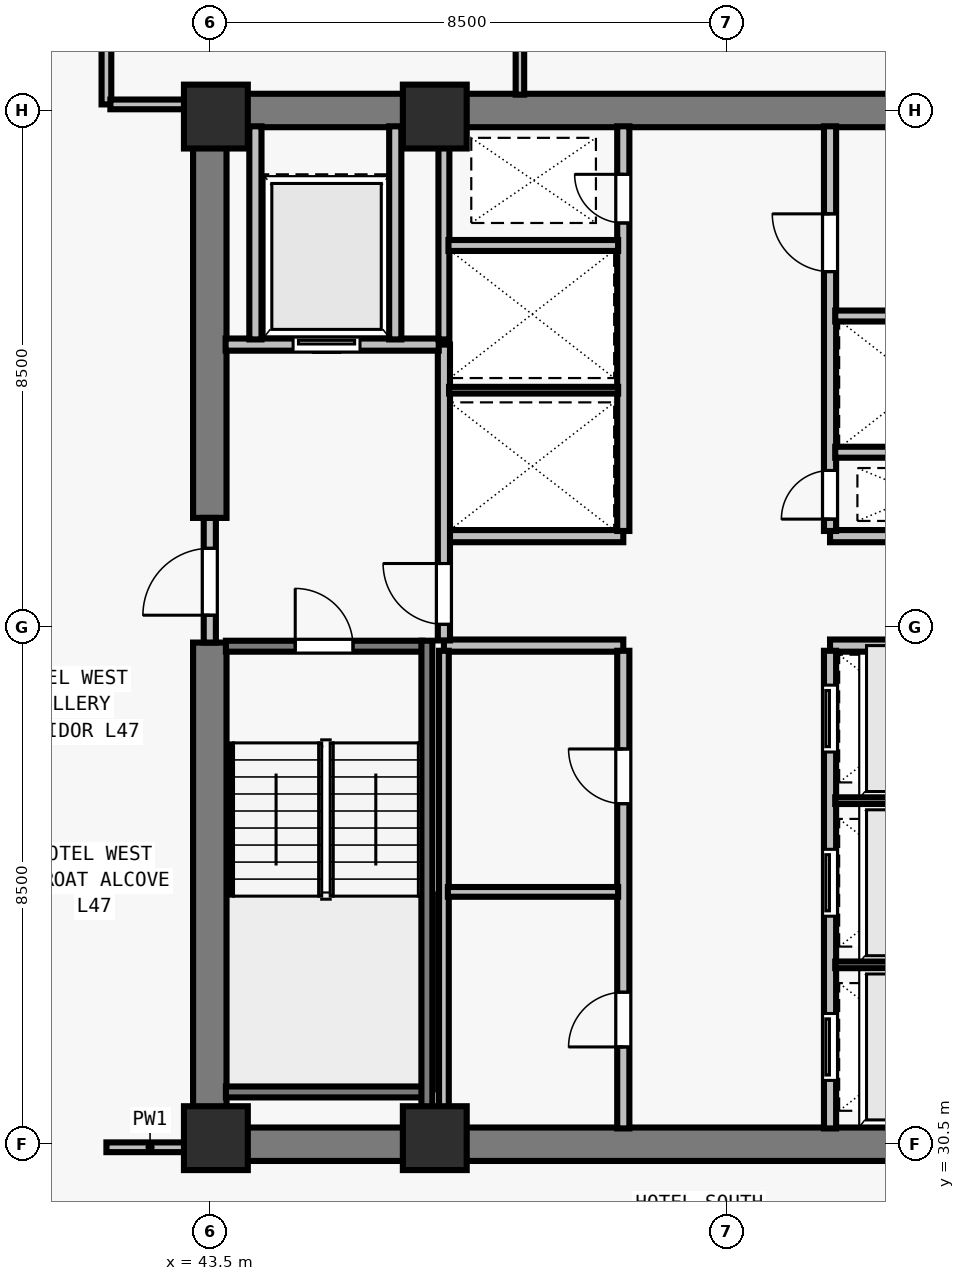
"""IFC4 building model, lengths in metres.
Left out: names, types, materials, properties, quantities, classifications, styles, units other than length and angle.
Written with IfcOpenShell. Run it as: python <this file> out.ifc"""

import sys

from ifc_helpers import new_model, si_unit, direction, frame, frame_2d, origin, origin_2d, place, context, subcontext, project, spatial, rectangle, extrude, element, fill, save


model = new_model("IFC4")
c1 = context("Model", 3, precision=1e-05, world=origin(), true_north=direction((0.0, 1.0)))
c2 = subcontext(c1, "Body", "Model", "MODEL_VIEW")
j1 = project(units=[si_unit("LENGTHUNIT", "METRE"), si_unit("PLANEANGLEUNIT", "RADIAN")], contexts=[c1])
p1 = place(None, origin())
s1 = spatial("IfcSite", under=j1, at=p1, CompositionType="ELEMENT")
p2 = place(p1, origin())
s2 = spatial("IfcBuilding", under=s1, at=p2, CompositionType="ELEMENT")
p3 = place(p2, frame((0.0, 0.0, 172.5)))
s3 = spatial("IfcBuildingStorey", under=s2, at=p3, CompositionType="ELEMENT", Elevation=172.5)
for number, where, z_axis, x_axis in (
    (1, (43.6, 30.6, 0.0), (0.0, 0.0, 1.0), (1.0, 0.0, 0.0)),
    (2, (47.2, 30.6, 0.0), (0.0, 0.0, 1.0), (1.0, 0.0, 0.0)),
    (3, (43.6, 47.4, 0.0), (0.0, 0.0, 1.0), (1.0, 0.0, 0.0)),
    (4, (47.2, 47.4, 0.0), (0.0, 0.0, 1.0), (1.0, 0.0, 0.0)),
):
    element("IfcColumn", number, at=place(p3, frame(where, z_axis=z_axis, x_axis=x_axis)), inside=s3, PredefinedType="COLUMN", context=c2, shape_type="SweptSolid", body=[
        extrude(rectangle(XDim=1.05, YDim=1.05, at=origin_2d()), origin(), (0.0, 0.0, 1.0), 3.5),
    ])
for number, where, z_axis, x_axis in (
    (5, (43.225, 30.5, 0.0), (0.0, 0.0, 1.0), (1.0, 0.0, 0.0)),
    (6, (43.225, 47.5, 0.0), (0.0, 0.0, 1.0), (1.0, 0.0, 0.0)),
):
    element("IfcWall", number, at=place(p3, frame(where, z_axis=z_axis, x_axis=x_axis)), inside=s3, PredefinedType="SHEAR", context=c2, shape_type="SweptSolid", body=[
        extrude(rectangle(XDim=17.55, YDim=0.55, at=frame_2d((8.775, 0.0))), origin(), (0.0, 0.0, 1.0), 3.28),
    ])
p4 = place(p3, frame((43.5, 30.765, 0.0), z_axis=(0.0, 0.0, 1.0), x_axis=(0.0, 1.0, 0.0)))
e7 = element("IfcWall", 7, at=p4, inside=s3, PredefinedType="SHEAR", context=c2, shape_type="SweptSolid", body=[
    extrude(rectangle(XDim=7.985, YDim=0.55, at=frame_2d((3.993, 0.0))), origin(), (0.0, 0.0, 1.0), 3.28),
])
p5 = place(p3, frame((43.5, 40.8, 0.0), z_axis=(0.0, 0.0, 1.0), x_axis=(0.0, 1.0, 0.0)))
e8 = element("IfcWall", 8, at=p5, inside=s3, PredefinedType="SHEAR", context=c2, shape_type="SweptSolid", body=[
    extrude(rectangle(XDim=6.435, YDim=0.55, at=frame_2d((3.218, 0.0))), origin(), (0.0, 0.0, 1.0), 3.28),
])
for number, where, z_axis, x_axis in (
    (9, (47.35, 38.7, 0.0), (0.0, 0.0, 1.0), (1.0, 0.0, 0.0)),
    (10, (47.35, 40.5, 0.0), (0.0, 0.0, 1.0), (1.0, 0.0, 0.0)),
    (11, (53.7, 38.7, 0.0), (0.0, 0.0, 1.0), (1.0, 0.0, 0.0)),
    (12, (53.7, 40.5, 0.0), (0.0, 0.0, 1.0), (1.0, 0.0, 0.0)),
):
    element("IfcWall", number, at=place(p3, frame(where, z_axis=z_axis, x_axis=x_axis)), inside=s3, PredefinedType="SOLIDWALL", context=c2, shape_type="SweptSolid", body=[
        extrude(rectangle(XDim=2.95, YDim=0.2, at=frame_2d((1.475, 0.0))), origin(), (0.0, 0.0, 1.0), 3.28),
    ])
p6 = place(p3, frame((50.3, 30.76, 0.0), z_axis=(0.0, 0.0, 1.0), x_axis=(0.0, 1.0, 0.0)))
e13 = element("IfcWall", 13, at=p6, inside=s3, PredefinedType="SOLIDWALL", context=c2, shape_type="SweptSolid", body=[
    extrude(rectangle(XDim=7.855, YDim=0.2, at=frame_2d((3.927, 0.0))), origin(), (0.0, 0.0, 1.0), 3.28),
])
p7 = place(p6, frame((1.34, 0.0, 0.0)))
e14 = element("IfcOpeningElement", 14, at=p7, cuts=e13, PredefinedType="OPENING", context=c2, shape_type="SweptSolid", body=[
    extrude(rectangle(XDim=0.9, YDim=2.12, at=frame_2d((0.45, 1.06))), frame((0.0, 0.11, 0.0), z_axis=(0.0, -1.0, 0.0), x_axis=(1.0, 0.0, 0.0)), (0.0, 0.0, 1.0), 0.22),
])
p8 = place(p6, frame((5.34, 0.0, 0.0)))
e15 = element("IfcOpeningElement", 15, at=p8, cuts=e13, PredefinedType="OPENING", context=c2, shape_type="SweptSolid", body=[
    extrude(rectangle(XDim=0.9, YDim=2.12, at=frame_2d((0.45, 1.06))), frame((0.0, 0.11, 0.0), z_axis=(0.0, -1.0, 0.0), x_axis=(1.0, 0.0, 0.0)), (0.0, 0.0, 1.0), 0.22),
])
p9 = place(p3, frame((53.7, 30.76, 0.0), z_axis=(0.0, 0.0, 1.0), x_axis=(0.0, 1.0, 0.0)))
e16 = element("IfcWall", 16, at=p9, inside=s3, PredefinedType="SOLIDWALL", context=c2, shape_type="SweptSolid", body=[
    extrude(rectangle(XDim=7.855, YDim=0.2, at=frame_2d((3.927, 0.0))), origin(), (0.0, 0.0, 1.0), 3.28),
])
p10 = place(p9, frame((0.79, 0.0, 0.0)))
e17 = element("IfcOpeningElement", 17, at=p10, cuts=e16, PredefinedType="OPENING", context=c2, shape_type="SweptSolid", body=[
    extrude(rectangle(XDim=1.1, YDim=2.2, at=frame_2d((0.55, 1.1))), frame((0.0, 0.11, 0.0), z_axis=(0.0, -1.0, 0.0), x_axis=(1.0, 0.0, 0.0)), (0.0, 0.0, 1.0), 0.22),
])
p11 = place(p9, frame((3.49, 0.0, 0.0)))
e18 = element("IfcOpeningElement", 18, at=p11, cuts=e16, PredefinedType="OPENING", context=c2, shape_type="SweptSolid", body=[
    extrude(rectangle(XDim=1.1, YDim=2.2, at=frame_2d((0.55, 1.1))), frame((0.0, 0.11, 0.0), z_axis=(0.0, -1.0, 0.0), x_axis=(1.0, 0.0, 0.0)), (0.0, 0.0, 1.0), 0.22),
])
p12 = place(p9, frame((6.19, 0.0, 0.0)))
e19 = element("IfcOpeningElement", 19, at=p12, cuts=e16, PredefinedType="OPENING", context=c2, shape_type="SweptSolid", body=[
    extrude(rectangle(XDim=1.1, YDim=2.2, at=frame_2d((0.55, 1.1))), frame((0.0, 0.11, 0.0), z_axis=(0.0, -1.0, 0.0), x_axis=(1.0, 0.0, 0.0)), (0.0, 0.0, 1.0), 0.22),
])
p13 = place(p3, frame((50.3, 40.585, 0.0), z_axis=(0.0, 0.0, 1.0), x_axis=(0.0, 1.0, 0.0)))
e20 = element("IfcWall", 20, at=p13, inside=s3, PredefinedType="SOLIDWALL", context=c2, shape_type="SweptSolid", body=[
    extrude(rectangle(XDim=6.655, YDim=0.2, at=frame_2d((3.328, 0.0))), origin(), (0.0, 0.0, 1.0), 3.28),
])
p14 = place(p13, frame((5.065, 0.0, 0.0)))
e21 = element("IfcOpeningElement", 21, at=p14, cuts=e20, PredefinedType="OPENING", context=c2, shape_type="SweptSolid", body=[
    extrude(rectangle(XDim=0.8, YDim=2.08, at=frame_2d((0.4, 1.04))), frame((0.0, 0.11, 0.0), z_axis=(0.0, -1.0, 0.0), x_axis=(1.0, 0.0, 0.0)), (0.0, 0.0, 1.0), 0.22),
])
p15 = place(p3, frame((53.7, 40.585, 0.0), z_axis=(0.0, 0.0, 1.0), x_axis=(0.0, 1.0, 0.0)))
e22 = element("IfcWall", 22, at=p15, inside=s3, PredefinedType="SOLIDWALL", context=c2, shape_type="SweptSolid", body=[
    extrude(rectangle(XDim=6.655, YDim=0.2, at=frame_2d((3.328, 0.0))), origin(), (0.0, 0.0, 1.0), 3.28),
])
p16 = place(p15, frame((0.195, 0.0, 0.0)))
e23 = element("IfcOpeningElement", 23, at=p16, cuts=e22, PredefinedType="OPENING", context=c2, shape_type="SweptSolid", body=[
    extrude(rectangle(XDim=0.8, YDim=2.08, at=frame_2d((0.4, 1.04))), frame((0.0, 0.11, 0.0), z_axis=(0.0, -1.0, 0.0), x_axis=(1.0, 0.0, 0.0)), (0.0, 0.0, 1.0), 0.22),
])
p17 = place(p15, frame((4.265, 0.0, 0.0)))
e24 = element("IfcOpeningElement", 24, at=p17, cuts=e22, PredefinedType="OPENING", context=c2, shape_type="SweptSolid", body=[
    extrude(rectangle(XDim=0.95, YDim=2.12, at=frame_2d((0.475, 1.06))), frame((0.0, 0.11, 0.0), z_axis=(0.0, -1.0, 0.0), x_axis=(1.0, 0.0, 0.0)), (0.0, 0.0, 1.0), 0.22),
])
p18 = place(p3, frame((43.5, 38.75, 0.0), z_axis=(0.0, 0.0, 1.0), x_axis=(0.0, 1.0, 0.0)))
e25 = element("IfcWall", 25, at=p18, inside=s3, PredefinedType="SOLIDWALL", context=c2, shape_type="SweptSolid", body=[
    extrude(rectangle(XDim=2.05, YDim=0.2, at=frame_2d((1.025, 0.0))), origin(), (0.0, 0.0, 1.0), 3.28),
])
p19 = place(p18, frame((0.45, 0.0, 0.0)))
e26 = element("IfcOpeningElement", 26, at=p19, cuts=e25, PredefinedType="OPENING", context=c2, shape_type="SweptSolid", body=[
    extrude(rectangle(XDim=1.1, YDim=2.15, at=frame_2d((0.55, 1.075))), frame((0.0, 0.11, 0.0), z_axis=(0.0, -1.0, 0.0), x_axis=(1.0, 0.0, 0.0)), (0.0, 0.0, 1.0), 0.22),
])
p20 = place(p3, frame((47.35, 38.785, 0.0), z_axis=(0.0, 0.0, 1.0), x_axis=(0.0, 1.0, 0.0)))
e27 = element("IfcWall", 27, at=p20, inside=s3, PredefinedType="SOLIDWALL", context=c2, shape_type="SweptSolid", body=[
    extrude(rectangle(XDim=4.865, YDim=0.2, at=frame_2d((2.433, 0.0))), origin(), (0.0, 0.0, 1.0), 3.28),
])
p21 = place(p20, frame((0.265, 0.0, 0.0)))
e28 = element("IfcOpeningElement", 28, at=p21, cuts=e27, PredefinedType="OPENING", context=c2, shape_type="SweptSolid", body=[
    extrude(rectangle(XDim=1.0, YDim=2.15, at=frame_2d((0.5, 1.075))), frame((0.0, 0.11, 0.0), z_axis=(0.0, -1.0, 0.0), x_axis=(1.0, 0.0, 0.0)), (0.0, 0.0, 1.0), 0.22),
])
p22 = place(p3, frame((43.76, 43.65, 0.0), z_axis=(0.0, 0.0, 1.0), x_axis=(1.0, 0.0, 0.0)))
e29 = element("IfcWall", 29, at=p22, inside=s3, PredefinedType="SOLIDWALL", context=c2, shape_type="SweptSolid", body=[
    extrude(rectangle(XDim=3.505, YDim=0.2, at=frame_2d((1.752, 0.0))), origin(), (0.0, 0.0, 1.0), 3.28),
])
p23 = place(p22, frame((1.11, 0.0, 0.0)))
e30 = element("IfcOpeningElement", 30, at=p23, cuts=e29, PredefinedType="OPENING", context=c2, shape_type="SweptSolid", body=[
    extrude(rectangle(XDim=1.1, YDim=2.2, at=frame_2d((0.55, 1.1))), frame((0.0, 0.11, 0.0), z_axis=(0.0, -1.0, 0.0), x_axis=(1.0, 0.0, 0.0)), (0.0, 0.0, 1.0), 0.22),
])
for number, where, z_axis, x_axis in (
    (31, (46.55, 43.735, 0.0), (0.0, 0.0, 1.0), (0.0, 1.0, 0.0)),
    (32, (44.25, 43.735, 0.0), (0.0, 0.0, 1.0), (0.0, 1.0, 0.0)),
):
    element("IfcWall", number, at=place(p3, frame(where, z_axis=z_axis, x_axis=x_axis)), inside=s3, PredefinedType="SOLIDWALL", context=c2, shape_type="SweptSolid", body=[
        extrude(rectangle(XDim=3.505, YDim=0.2, at=frame_2d((1.752, 0.0))), origin(), (0.0, 0.0, 1.0), 3.28),
    ])
p24 = place(p3, frame((47.35, 30.76, 0.0), z_axis=(0.0, 0.0, 1.0), x_axis=(0.0, 1.0, 0.0)))
e33 = element("IfcWall", 33, at=p24, inside=s3, PredefinedType="PARTITIONING", context=c2, shape_type="SweptSolid", body=[
    extrude(rectangle(XDim=7.855, YDim=0.16, at=frame_2d((3.927, 0.0))), origin(), (0.0, 0.0, 1.0), 3.28),
])
p25 = place(p3, frame((47.415, 34.65, 0.0), z_axis=(0.0, 0.0, 1.0), x_axis=(1.0, 0.0, 0.0)))
e34 = element("IfcWall", 34, at=p25, inside=s3, PredefinedType="PARTITIONING", context=c2, shape_type="SweptSolid", body=[
    extrude(rectangle(XDim=2.8, YDim=0.16, at=frame_2d((1.4, 0.0))), origin(), (0.0, 0.0, 1.0), 3.28),
])
for number, where, z_axis, x_axis in (
    (35, (53.785, 33.45, 0.0), (0.0, 0.0, 1.0), (1.0, 0.0, 0.0)),
    (36, (53.785, 36.15, 0.0), (0.0, 0.0, 1.0), (1.0, 0.0, 0.0)),
):
    element("IfcWall", number, at=place(p3, frame(where, z_axis=z_axis, x_axis=x_axis)), inside=s3, PredefinedType="PARTITIONING", context=c2, shape_type="SweptSolid", body=[
        extrude(rectangle(XDim=2.79, YDim=0.11, at=frame_2d((1.395, 0.0))), origin(), (0.0, 0.0, 1.0), 3.28),
    ])
p26 = place(p3, frame((47.35, 43.735, 0.0), z_axis=(0.0, 0.0, 1.0), x_axis=(0.0, 1.0, 0.0)))
e37 = element("IfcWall", 37, at=p26, inside=s3, PredefinedType="SOLIDWALL", context=c2, shape_type="SweptSolid", body=[
    extrude(rectangle(XDim=3.505, YDim=0.18, at=frame_2d((1.752, 0.0))), origin(), (0.0, 0.0, 1.0), 3.28),
])
p27 = place(p3, frame((47.435, 42.9, 0.0), z_axis=(0.0, 0.0, 1.0), x_axis=(1.0, 0.0, 0.0)))
e38 = element("IfcWall", 38, at=p27, inside=s3, PredefinedType="PARTITIONING", context=c2, shape_type="SweptSolid", body=[
    extrude(rectangle(XDim=2.78, YDim=0.11, at=frame_2d((1.39, 0.0))), origin(), (0.0, 0.0, 1.0), 3.28),
])
p28 = place(p3, frame((47.425, 45.28, 0.0), z_axis=(0.0, 0.0, 1.0), x_axis=(1.0, 0.0, 0.0)))
e39 = element("IfcWall", 39, at=p28, inside=s3, PredefinedType="SOLIDWALL", context=c2, shape_type="SweptSolid", body=[
    extrude(rectangle(XDim=2.79, YDim=0.18, at=frame_2d((1.395, 0.0))), origin(), (0.0, 0.0, 1.0), 3.28),
])
p29 = place(p3, frame((53.785, 41.88, 0.0), z_axis=(0.0, 0.0, 1.0), x_axis=(1.0, 0.0, 0.0)))
e40 = element("IfcWall", 40, at=p29, inside=s3, PredefinedType="SOLIDWALL", context=c2, shape_type="SweptSolid", body=[
    extrude(rectangle(XDim=2.78, YDim=0.18, at=frame_2d((1.39, 0.0))), origin(), (0.0, 0.0, 1.0), 3.28),
])
p30 = place(p3, frame((53.785, 44.12, 0.0), z_axis=(0.0, 0.0, 1.0), x_axis=(1.0, 0.0, 0.0)))
e41 = element("IfcWall", 41, at=p30, inside=s3, PredefinedType="SOLIDWALL", context=c2, shape_type="SweptSolid", body=[
    extrude(rectangle(XDim=2.79, YDim=0.18, at=frame_2d((1.395, 0.0))), origin(), (0.0, 0.0, 1.0), 3.28),
])
p31 = place(p3, frame((41.8, 47.6, 0.0), z_axis=(0.0, 0.0, 1.0), x_axis=(0.0, 1.0, 0.0)))
e42 = element("IfcWall", 42, at=p31, inside=s3, PredefinedType="PARTITIONING", context=c2, shape_type="SweptSolid", body=[
    extrude(rectangle(XDim=15.075, YDim=0.16, at=frame_2d((7.538, 0.0))), origin(), (0.0, 0.0, 1.0), 2.555),
])
p32 = place(p31, frame((3.5, 0.0, 0.0)))
e43 = element("IfcOpeningElement", 43, at=p32, cuts=e42, PredefinedType="OPENING", context=c2, shape_type="SweptSolid", body=[
    extrude(rectangle(XDim=0.96, YDim=2.12, at=frame_2d((0.48, 1.06))), frame((0.0, 0.09, 0.0), z_axis=(0.0, -1.0, 0.0), x_axis=(1.0, 0.0, 0.0)), (0.0, 0.0, 1.0), 0.18),
])
p33 = place(p3, frame((41.8, 30.45, 0.0), z_axis=(0.0, 0.0, 1.0), x_axis=(1.0, 0.0, 0.0)))
e44 = element("IfcWall", 44, at=p33, inside=s3, PredefinedType="PARTITIONING", context=c2, shape_type="SweptSolid", body=[
    extrude(rectangle(XDim=1.435, YDim=0.16, at=frame_2d((0.718, 0.0))), origin(), (0.0, 0.0, 1.0), 3.28),
])
p34 = place(p3, frame((41.865, 47.6, 0.0), z_axis=(0.0, 0.0, 1.0), x_axis=(1.0, 0.0, 0.0)))
e45 = element("IfcWall", 45, at=p34, inside=s3, PredefinedType="PARTITIONING", context=c2, shape_type="SweptSolid", body=[
    extrude(rectangle(XDim=1.37, YDim=0.16, at=frame_2d((0.685, 0.0))), origin(), (0.0, 0.0, 1.0), 3.28),
])
p35 = place(p3, frame((48.6, 47.76, 0.0), z_axis=(0.0, 0.0, 1.0), x_axis=(0.0, 1.0, 0.0)))
e46 = element("IfcWall", 46, at=p35, inside=s3, PredefinedType="PARTITIONING", context=c2, shape_type="SweptSolid", body=[
    extrude(rectangle(XDim=14.915, YDim=0.14, at=frame_2d((7.458, 0.0))), origin(), (0.0, 0.0, 1.0), 2.896),
])
p36 = place(p35, frame((2.34, 0.0, 0.0)))
e47 = element("IfcOpeningElement", 47, at=p36, cuts=e46, PredefinedType="OPENING", context=c2, shape_type="SweptSolid", body=[
    extrude(rectangle(XDim=0.96, YDim=2.12, at=frame_2d((0.48, 1.06))), frame((0.0, 0.08, 0.0), z_axis=(0.0, -1.0, 0.0), x_axis=(1.0, 0.0, 0.0)), (0.0, 0.0, 1.0), 0.16),
])
p37 = place(p3, frame((43.765, 38.69, 0.0), z_axis=(0.0, 0.0, 1.0), x_axis=(1.0, 0.0, 0.0)))
e48 = element("IfcWall", 48, at=p37, inside=s3, PredefinedType="SOLIDWALL", context=c2, shape_type="SweptSolid", body=[
    extrude(rectangle(XDim=3.23, YDim=0.18, at=frame_2d((1.615, 0.0))), origin(), (0.0, 0.0, 1.0), 3.28),
])
p38 = place(p37, frame((1.14, 0.0, 0.0)))
e49 = element("IfcOpeningElement", 49, at=p38, cuts=e48, PredefinedType="OPENING", context=c2, shape_type="SweptSolid", body=[
    extrude(rectangle(XDim=0.95, YDim=2.15, at=frame_2d((0.475, 1.075))), frame((0.0, 0.1, 0.0), z_axis=(0.0, -1.0, 0.0), x_axis=(1.0, 0.0, 0.0)), (0.0, 0.0, 1.0), 0.2),
])
p39 = place(p3, frame((43.765, 31.36, 0.0), z_axis=(0.0, 0.0, 1.0), x_axis=(1.0, 0.0, 0.0)))
e50 = element("IfcWall", 50, at=p39, inside=s3, PredefinedType="SOLIDWALL", context=c2, shape_type="SweptSolid", body=[
    extrude(rectangle(XDim=3.23, YDim=0.18, at=frame_2d((1.615, 0.0))), origin(), (0.0, 0.0, 1.0), 3.28),
])
p40 = place(p3, frame((47.07, 38.78, 0.0), z_axis=(0.0, 0.0, 1.0), x_axis=(0.0, -1.0, 0.0)))
e51 = element("IfcWall", 51, at=p40, inside=s3, PredefinedType="SOLIDWALL", context=c2, shape_type="SweptSolid", body=[
    extrude(rectangle(XDim=8.017, YDim=0.18, at=frame_2d((4.009, 0.0))), origin(), (0.0, 0.0, 1.0), 3.28),
])
p41 = place(p19, origin())
e52 = element("IfcDoor", 52, at=p41, inside=s3, OperationType="SINGLE_SWING_LEFT", PredefinedType="DOOR", context=c2, shape_type="SweptSolid", body=[
    extrude(rectangle(XDim=1.1, YDim=2.15, at=frame_2d((0.55, 1.075))), frame((0.0, 0.025, 0.0), z_axis=(0.0, -1.0, 0.0), x_axis=(1.0, 0.0, 0.0)), (0.0, 0.0, 1.0), 0.05),
])
fill(e26, e52)
p42 = place(p21, origin())
e53 = element("IfcDoor", 53, at=p42, inside=s3, OperationType="SINGLE_SWING_RIGHT", PredefinedType="DOOR", context=c2, shape_type="SweptSolid", body=[
    extrude(rectangle(XDim=1.0, YDim=2.15, at=frame_2d((0.5, 1.075))), frame((0.0, 0.025, 0.0), z_axis=(0.0, -1.0, 0.0), x_axis=(1.0, 0.0, 0.0)), (0.0, 0.0, 1.0), 0.05),
])
fill(e28, e53)
p43 = place(p23, origin())
e54 = element("IfcDoor", 54, at=p43, inside=s3, OperationType="SLIDING_TO_LEFT", PredefinedType="DOOR", context=c2, shape_type="SweptSolid", body=[
    extrude(rectangle(XDim=1.1, YDim=2.2, at=frame_2d((0.55, 1.1))), frame((0.0, 0.025, 0.0), z_axis=(0.0, -1.0, 0.0), x_axis=(1.0, 0.0, 0.0)), (0.0, 0.0, 1.0), 0.05),
])
fill(e30, e54)
p44 = place(p7, origin())
e55 = element("IfcDoor", 55, at=p44, inside=s3, OperationType="SINGLE_SWING_LEFT", PredefinedType="DOOR", context=c2, shape_type="SweptSolid", body=[
    extrude(rectangle(XDim=0.9, YDim=2.12, at=frame_2d((0.45, 1.06))), frame((0.0, 0.025, 0.0), z_axis=(0.0, -1.0, 0.0), x_axis=(1.0, 0.0, 0.0)), (0.0, 0.0, 1.0), 0.05),
])
fill(e14, e55)
p45 = place(p8, origin())
e56 = element("IfcDoor", 56, at=p45, inside=s3, OperationType="SINGLE_SWING_RIGHT", PredefinedType="DOOR", context=c2, shape_type="SweptSolid", body=[
    extrude(rectangle(XDim=0.9, YDim=2.12, at=frame_2d((0.45, 1.06))), frame((0.0, 0.025, 0.0), z_axis=(0.0, -1.0, 0.0), x_axis=(1.0, 0.0, 0.0)), (0.0, 0.0, 1.0), 0.05),
])
fill(e15, e56)
p46 = place(p10, origin())
e57 = element("IfcDoor", 57, at=p46, inside=s3, OperationType="SLIDING_TO_LEFT", PredefinedType="DOOR", context=c2, shape_type="SweptSolid", body=[
    extrude(rectangle(XDim=1.1, YDim=2.2, at=frame_2d((0.55, 1.1))), frame((0.0, 0.025, 0.0), z_axis=(0.0, -1.0, 0.0), x_axis=(1.0, 0.0, 0.0)), (0.0, 0.0, 1.0), 0.05),
])
fill(e17, e57)
p47 = place(p11, origin())
e58 = element("IfcDoor", 58, at=p47, inside=s3, OperationType="SLIDING_TO_LEFT", PredefinedType="DOOR", context=c2, shape_type="SweptSolid", body=[
    extrude(rectangle(XDim=1.1, YDim=2.2, at=frame_2d((0.55, 1.1))), frame((0.0, 0.025, 0.0), z_axis=(0.0, -1.0, 0.0), x_axis=(1.0, 0.0, 0.0)), (0.0, 0.0, 1.0), 0.05),
])
fill(e18, e58)
p48 = place(p12, origin())
e59 = element("IfcDoor", 59, at=p48, inside=s3, OperationType="SLIDING_TO_LEFT", PredefinedType="DOOR", context=c2, shape_type="SweptSolid", body=[
    extrude(rectangle(XDim=1.1, YDim=2.2, at=frame_2d((0.55, 1.1))), frame((0.0, 0.025, 0.0), z_axis=(0.0, -1.0, 0.0), x_axis=(1.0, 0.0, 0.0)), (0.0, 0.0, 1.0), 0.05),
])
fill(e19, e59)
p49 = place(p14, origin())
e60 = element("IfcDoor", 60, at=p49, inside=s3, OperationType="SINGLE_SWING_RIGHT", PredefinedType="DOOR", context=c2, shape_type="SweptSolid", body=[
    extrude(rectangle(XDim=0.8, YDim=2.08, at=frame_2d((0.4, 1.04))), frame((0.0, 0.025, 0.0), z_axis=(0.0, -1.0, 0.0), x_axis=(1.0, 0.0, 0.0)), (0.0, 0.0, 1.0), 0.05),
])
fill(e21, e60)
p50 = place(p16, origin())
e61 = element("IfcDoor", 61, at=p50, inside=s3, OperationType="SINGLE_SWING_LEFT", PredefinedType="DOOR", context=c2, shape_type="SweptSolid", body=[
    extrude(rectangle(XDim=0.8, YDim=2.08, at=frame_2d((0.4, 1.04))), frame((0.0, 0.025, 0.0), z_axis=(0.0, -1.0, 0.0), x_axis=(1.0, 0.0, 0.0)), (0.0, 0.0, 1.0), 0.05),
])
fill(e23, e61)
p51 = place(p17, origin())
e62 = element("IfcDoor", 62, at=p51, inside=s3, OperationType="SINGLE_SWING_RIGHT", PredefinedType="DOOR", context=c2, shape_type="SweptSolid", body=[
    extrude(rectangle(XDim=0.95, YDim=2.12, at=frame_2d((0.475, 1.06))), frame((0.0, 0.025, 0.0), z_axis=(0.0, -1.0, 0.0), x_axis=(1.0, 0.0, 0.0)), (0.0, 0.0, 1.0), 0.05),
])
fill(e24, e62)
p52 = place(p38, origin())
e63 = element("IfcDoor", 63, at=p52, inside=s3, OperationType="SINGLE_SWING_LEFT", PredefinedType="DOOR", context=c2, shape_type="SweptSolid", body=[
    extrude(rectangle(XDim=0.95, YDim=2.15, at=frame_2d((0.475, 1.075))), frame((0.0, 0.025, 0.0), z_axis=(0.0, -1.0, 0.0), x_axis=(1.0, 0.0, 0.0)), (0.0, 0.0, 1.0), 0.05),
])
fill(e49, e63)
save(model, sys.argv[1])
